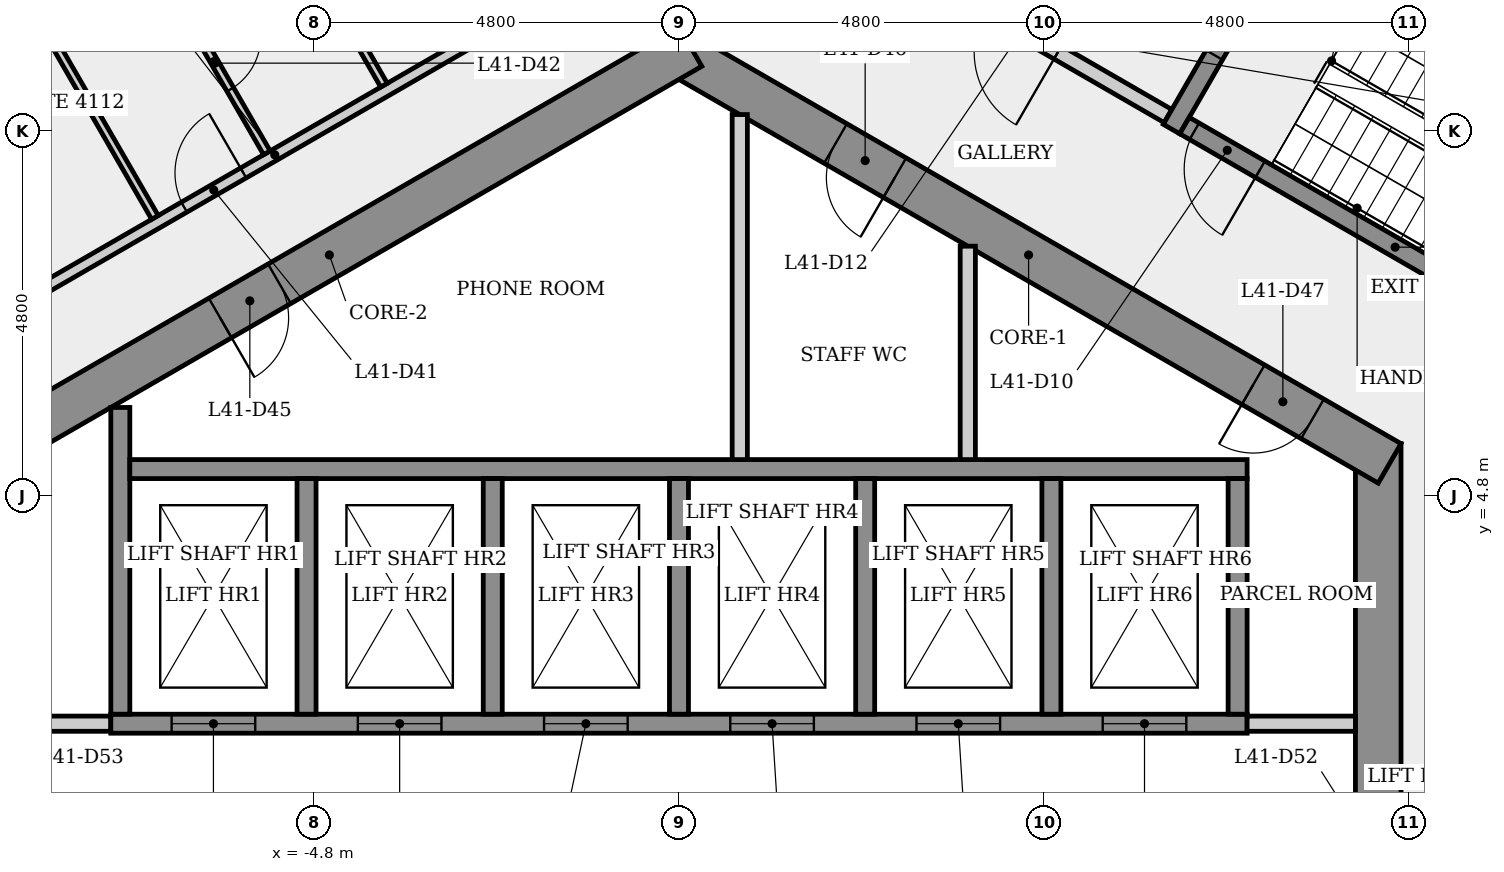
"""IFC4 building model, lengths in metres.
Left out: names, types, materials, properties, quantities, classifications, styles, units other than length and angle.
Written with IfcOpenShell. Run it as: python <this file> out.ifc"""

import sys

from ifc_helpers import new_model, si_unit, direction, frame, frame_2d, origin, place, context, subcontext, project, spatial, rectangle, extrude, element, fill, save


model = new_model("IFC4")
c1 = context("Model", 3, precision=1e-05, world=origin(), true_north=direction((0.0, 1.0)))
c2 = subcontext(c1, "Body", "Model", "MODEL_VIEW")
j1 = project(units=[si_unit("LENGTHUNIT", "METRE"), si_unit("PLANEANGLEUNIT", "RADIAN")], contexts=[c1])
p1 = place(None, origin())
s1 = spatial("IfcSite", under=j1, at=p1, CompositionType="ELEMENT")
p2 = place(p1, origin())
s2 = spatial("IfcBuilding", under=s1, at=p2, CompositionType="ELEMENT")
p3 = place(p2, frame((0.0, 0.0, 156.1)))
s3 = spatial("IfcBuildingStorey", under=s2, at=p3, CompositionType="ELEMENT", Elevation=156.1)
p4 = place(p3, frame((9.2, -5.485, 0.0), z_axis=(0.0, 0.0, 1.0), x_axis=(0.0, 1.0, 0.0)))
e1 = element("IfcWall", 1, at=p4, inside=s3, PredefinedType="SHEAR", context=c2, shape_type="SweptSolid", body=[
    extrude(rectangle(XDim=10.97, YDim=0.6, at=frame_2d((5.485, 0.0))), origin(), (0.0, 0.0, 1.0), 3.4),
])
p5 = place(p4, frame((4.685, 0.0, 0.0)))
e2 = element("IfcOpeningElement", 2, at=p5, cuts=e1, PredefinedType="OPENING", context=c2, shape_type="SweptSolid", body=[
    extrude(rectangle(XDim=1.6, YDim=2.1, at=frame_2d((0.8, 1.05))), frame((0.0, 0.31, 0.0), z_axis=(0.0, -1.0, 0.0), x_axis=(1.0, 0.0, 0.0)), (0.0, 0.0, 1.0), 0.62),
])
p6 = place(p3, frame((9.35, 5.225, 0.0), z_axis=(0.0, 0.0, 1.0), x_axis=(-0.866023993627, 0.500002442456, 0.0)))
e3 = element("IfcWall", 3, at=p6, inside=s3, PredefinedType="SHEAR", context=c2, shape_type="SweptSolid", body=[
    extrude(rectangle(XDim=10.97, YDim=0.6, at=frame_2d((5.485, 0.0))), origin(), (0.0, 0.0, 1.0), 3.4),
])
p7 = place(p6, frame((7.518, 0.0, 0.0)))
e4 = element("IfcOpeningElement", 4, at=p7, cuts=e3, PredefinedType="OPENING", context=c2, shape_type="SweptSolid", body=[
    extrude(rectangle(XDim=0.9, YDim=2.1, at=frame_2d((0.45, 1.05))), frame((0.0, 0.31, 0.0), z_axis=(0.0, -1.0, 0.0), x_axis=(1.0, 0.0, 0.0)), (0.0, 0.0, 1.0), 0.62),
])
p8 = place(p6, frame((1.172, 0.0, 0.0)))
e5 = element("IfcOpeningElement", 5, at=p8, cuts=e3, PredefinedType="OPENING", context=c2, shape_type="SweptSolid", body=[
    extrude(rectangle(XDim=0.9, YDim=2.1, at=frame_2d((0.45, 1.05))), frame((0.0, 0.31, 0.0), z_axis=(0.0, -1.0, 0.0), x_axis=(1.0, 0.0, 0.0)), (0.0, 0.0, 1.0), 0.62),
])
p9 = place(p3, frame((0.15, 10.71, 0.0), z_axis=(0.0, 0.0, 1.0), x_axis=(-0.866023993627, -0.500002442456, 0.0)))
e6 = element("IfcWall", 6, at=p9, inside=s3, PredefinedType="SHEAR", context=c2, shape_type="SweptSolid", body=[
    extrude(rectangle(XDim=10.97, YDim=0.6, at=frame_2d((5.485, 0.0))), origin(), (0.0, 0.0, 1.0), 3.4),
])
p10 = place(p9, frame((6.243, 0.0, 0.0)))
e7 = element("IfcOpeningElement", 7, at=p10, cuts=e6, PredefinedType="OPENING", context=c2, shape_type="SweptSolid", body=[
    extrude(rectangle(XDim=0.9, YDim=2.1, at=frame_2d((0.45, 1.05))), frame((0.0, 0.31, 0.0), z_axis=(0.0, -1.0, 0.0), x_axis=(1.0, 0.0, 0.0)), (0.0, 0.0, 1.0), 0.62),
])
p11 = place(p3, frame((-9.805, 6.694, 0.0), z_axis=(0.0, 0.0, 1.0), x_axis=(0.866028286753, 0.499995006518, 0.0)))
e8 = element("IfcWall", 8, at=p11, inside=s3, PredefinedType="PARTITIONING", context=c2, shape_type="SweptSolid", body=[
    extrude(rectangle(XDim=10.364, YDim=0.15, at=frame_2d((5.182, 0.0))), origin(), (0.0, 0.0, 1.0), 3.05),
])
p12 = place(p11, frame((3.805, 0.0, 0.0)))
e9 = element("IfcOpeningElement", 9, at=p12, cuts=e8, PredefinedType="OPENING", context=c2, shape_type="SweptSolid", body=[
    extrude(rectangle(XDim=0.9, YDim=2.1, at=frame_2d((0.45, 1.05))), frame((0.0, 0.085, 0.0), z_axis=(0.0, -1.0, 0.0), x_axis=(1.0, 0.0, 0.0)), (0.0, 0.0, 1.0), 0.17),
])
p13 = place(p3, frame((-8.9, 1.8, 0.0), z_axis=(0.0, 0.0, 1.0), x_axis=(1.0, 0.0, 0.0)))
e10 = element("IfcWall", 10, at=p13, inside=s3, PredefinedType="PARTITIONING", context=c2, shape_type="SweptSolid", body=[
    extrude(rectangle(XDim=1.425, YDim=0.2, at=frame_2d((0.712, 0.0))), origin(), (0.0, 0.0, 1.0), 3.05),
])
p14 = place(p3, frame((-10.6, 14.88, 0.0), z_axis=(0.0, 0.0, 1.0), x_axis=(0.499997136009, -0.866027057304, 0.0)))
e11 = element("IfcWall", 11, at=p14, inside=s3, PredefinedType="PARTITIONING", context=c2, shape_type="SweptSolid", body=[
    extrude(rectangle(XDim=7.412, YDim=0.1, at=frame_2d((3.706, 0.0))), origin(), (0.0, 0.0, 1.0), 3.05),
])
p15 = place(p3, frame((-7.475, 1.8, 0.0), z_axis=(0.0, 0.0, 1.0), x_axis=(1.0, 0.0, 0.0)))
e12 = element("IfcWall", 12, at=p15, inside=s3, PredefinedType="SHEAR", context=c2, shape_type="SweptSolid", body=[
    extrude(rectangle(XDim=14.95, YDim=0.25, at=frame_2d((7.475, 0.0))), origin(), (0.0, 0.0, 1.0), 3.05),
])
p16 = place(p15, frame((0.8, 0.0, 0.0)))
e13 = element("IfcOpeningElement", 13, at=p16, cuts=e12, PredefinedType="OPENING", context=c2, shape_type="SweptSolid", body=[
    extrude(rectangle(XDim=1.1, YDim=2.1, at=frame_2d((0.55, 1.05))), frame((0.0, 0.135, 0.0), z_axis=(0.0, -1.0, 0.0), x_axis=(1.0, 0.0, 0.0)), (0.0, 0.0, 1.0), 0.27),
])
p17 = place(p15, frame((3.25, 0.0, 0.0)))
e14 = element("IfcOpeningElement", 14, at=p17, cuts=e12, PredefinedType="OPENING", context=c2, shape_type="SweptSolid", body=[
    extrude(rectangle(XDim=1.1, YDim=2.1, at=frame_2d((0.55, 1.05))), frame((0.0, 0.135, 0.0), z_axis=(0.0, -1.0, 0.0), x_axis=(1.0, 0.0, 0.0)), (0.0, 0.0, 1.0), 0.27),
])
p18 = place(p15, frame((5.7, 0.0, 0.0)))
e15 = element("IfcOpeningElement", 15, at=p18, cuts=e12, PredefinedType="OPENING", context=c2, shape_type="SweptSolid", body=[
    extrude(rectangle(XDim=1.1, YDim=2.1, at=frame_2d((0.55, 1.05))), frame((0.0, 0.135, 0.0), z_axis=(0.0, -1.0, 0.0), x_axis=(1.0, 0.0, 0.0)), (0.0, 0.0, 1.0), 0.27),
])
p19 = place(p15, frame((8.15, 0.0, 0.0)))
e16 = element("IfcOpeningElement", 16, at=p19, cuts=e12, PredefinedType="OPENING", context=c2, shape_type="SweptSolid", body=[
    extrude(rectangle(XDim=1.1, YDim=2.1, at=frame_2d((0.55, 1.05))), frame((0.0, 0.135, 0.0), z_axis=(0.0, -1.0, 0.0), x_axis=(1.0, 0.0, 0.0)), (0.0, 0.0, 1.0), 0.27),
])
p20 = place(p15, frame((10.6, 0.0, 0.0)))
e17 = element("IfcOpeningElement", 17, at=p20, cuts=e12, PredefinedType="OPENING", context=c2, shape_type="SweptSolid", body=[
    extrude(rectangle(XDim=1.1, YDim=2.1, at=frame_2d((0.55, 1.05))), frame((0.0, 0.135, 0.0), z_axis=(0.0, -1.0, 0.0), x_axis=(1.0, 0.0, 0.0)), (0.0, 0.0, 1.0), 0.27),
])
p21 = place(p15, frame((13.05, 0.0, 0.0)))
e18 = element("IfcOpeningElement", 18, at=p21, cuts=e12, PredefinedType="OPENING", context=c2, shape_type="SweptSolid", body=[
    extrude(rectangle(XDim=1.1, YDim=2.1, at=frame_2d((0.55, 1.05))), frame((0.0, 0.135, 0.0), z_axis=(0.0, -1.0, 0.0), x_axis=(1.0, 0.0, 0.0)), (0.0, 0.0, 1.0), 0.27),
])
p22 = place(p3, frame((-7.35, 1.925, 0.0), z_axis=(0.0, 0.0, 1.0), x_axis=(0.0, 1.0, 0.0)))
e19 = element("IfcWall", 19, at=p22, inside=s3, PredefinedType="SHEAR", context=c2, shape_type="SweptSolid", body=[
    extrude(rectangle(XDim=4.036, YDim=0.25, at=frame_2d((2.018, 0.0))), origin(), (0.0, 0.0, 1.0), 3.05),
])
p23 = place(p3, frame((-7.225, 5.15, 0.0), z_axis=(0.0, 0.0, 1.0), x_axis=(1.0, 0.0, 0.0)))
e20 = element("IfcWall", 20, at=p23, inside=s3, PredefinedType="SHEAR", context=c2, shape_type="SweptSolid", body=[
    extrude(rectangle(XDim=14.7, YDim=0.25, at=frame_2d((7.35, 0.0))), origin(), (0.0, 0.0, 1.0), 3.05),
])
p24 = place(p3, frame((-6.81, 11.715, 0.0), z_axis=(0.0, 0.0, 1.0), x_axis=(0.50000932403, -0.866020020486, 0.0)))
e21 = element("IfcWall", 21, at=p24, inside=s3, PredefinedType="PARTITIONING", context=c2, shape_type="SweptSolid", body=[
    extrude(rectangle(XDim=2.775, YDim=0.1, at=frame_2d((1.387, 0.0))), origin(), (0.0, 0.0, 1.0), 3.05),
])
p25 = place(p24, frame((1.012, 0.0, 0.0)))
e22 = element("IfcOpeningElement", 22, at=p25, cuts=e21, PredefinedType="OPENING", context=c2, shape_type="SweptSolid", body=[
    extrude(rectangle(XDim=0.8, YDim=2.1, at=frame_2d((0.4, 1.05))), frame((0.0, 0.06, 0.0), z_axis=(0.0, -1.0, 0.0), x_axis=(1.0, 0.0, 0.0)), (0.0, 0.0, 1.0), 0.12),
])
p26 = place(p3, frame((-7.586, 16.62, 0.0), z_axis=(0.0, 0.0, 1.0), x_axis=(0.500011399757, -0.866018822032, 0.0)))
e23 = element("IfcWall", 23, at=p26, inside=s3, PredefinedType="PARTITIONING", context=c2, shape_type="SweptSolid", body=[
    extrude(rectangle(XDim=7.411, YDim=0.1, at=frame_2d((3.706, 0.0))), origin(), (0.0, 0.0, 1.0), 3.05),
])
for number, where, z_axis, x_axis in (
    (24, (-4.9, 5.025, 0.0), (0.0, 0.0, 1.0), (0.0, -1.0, 0.0)),
    (25, (-2.45, 5.025, 0.0), (0.0, 0.0, 1.0), (0.0, -1.0, 0.0)),
    (26, (0.0, 5.025, 0.0), (0.0, 0.0, 1.0), (0.0, -1.0, 0.0)),
):
    element("IfcWall", number, at=place(p3, frame(where, z_axis=z_axis, x_axis=x_axis)), inside=s3, PredefinedType="SHEAR", context=c2, shape_type="SweptSolid", body=[
        extrude(rectangle(XDim=3.1, YDim=0.25, at=frame_2d((1.55, 0.0))), origin(), (0.0, 0.0, 1.0), 3.4),
    ])
p27 = place(p3, frame((0.8, 9.815, 0.0), z_axis=(0.0, 0.0, 1.0), x_axis=(0.0, -1.0, 0.0)))
e27 = element("IfcWall", 27, at=p27, inside=s3, PredefinedType="PARTITIONING", context=c2, shape_type="SweptSolid", body=[
    extrude(rectangle(XDim=4.54, YDim=0.2, at=frame_2d((2.27, 0.0))), origin(), (0.0, 0.0, 1.0), 3.05),
])
p28 = place(p3, frame((2.45, 5.025, 0.0), z_axis=(0.0, 0.0, 1.0), x_axis=(0.0, -1.0, 0.0)))
e28 = element("IfcWall", 28, at=p28, inside=s3, PredefinedType="SHEAR", context=c2, shape_type="SweptSolid", body=[
    extrude(rectangle(XDim=3.1, YDim=0.25, at=frame_2d((1.55, 0.0))), origin(), (0.0, 0.0, 1.0), 3.4),
])
p29 = place(p3, frame((3.8, 8.083, 0.0), z_axis=(0.0, 0.0, 1.0), x_axis=(0.0, -1.0, 0.0)))
e29 = element("IfcWall", 29, at=p29, inside=s3, PredefinedType="PARTITIONING", context=c2, shape_type="SweptSolid", body=[
    extrude(rectangle(XDim=2.808, YDim=0.2, at=frame_2d((1.404, 0.0))), origin(), (0.0, 0.0, 1.0), 3.05),
])
p30 = place(p3, frame((4.9, 5.025, 0.0), z_axis=(0.0, 0.0, 1.0), x_axis=(0.0, -1.0, 0.0)))
e30 = element("IfcWall", 30, at=p30, inside=s3, PredefinedType="SHEAR", context=c2, shape_type="SweptSolid", body=[
    extrude(rectangle(XDim=3.1, YDim=0.25, at=frame_2d((1.55, 0.0))), origin(), (0.0, 0.0, 1.0), 3.4),
])
p31 = place(p3, frame((6.435, 9.795, 0.0), z_axis=(0.0, 0.0, 1.0), x_axis=(-0.866012907634, 0.500021643343, 0.0)))
e31 = element("IfcWall", 31, at=p31, inside=s3, PredefinedType="PARTITIONING", context=c2, shape_type="SweptSolid", body=[
    extrude(rectangle(XDim=4.45, YDim=0.2, at=frame_2d((2.225, 0.0))), origin(), (0.0, 0.0, 1.0), 3.05),
])
p32 = place(p31, frame((1.675, 0.0, 0.0)))
e32 = element("IfcOpeningElement", 32, at=p32, cuts=e31, PredefinedType="OPENING", context=c2, shape_type="SweptSolid", body=[
    extrude(rectangle(XDim=1.1, YDim=2.1, at=frame_2d((0.55, 1.05))), frame((0.0, 0.11, 0.0), z_axis=(0.0, -1.0, 0.0), x_axis=(1.0, 0.0, 0.0)), (0.0, 0.0, 1.0), 0.22),
])
p33 = place(p3, frame((6.48, 9.624, 0.0), z_axis=(0.0, 0.0, 1.0), x_axis=(0.500017246033, 0.866015446554, 0.0)))
e33 = element("IfcWall", 33, at=p33, inside=s3, PredefinedType="SHEAR", context=c2, shape_type="SweptSolid", body=[
    extrude(rectangle(XDim=3.25, YDim=0.25, at=frame_2d((1.625, 0.0))), origin(), (0.0, 0.0, 1.0), 3.05),
])
p34 = place(p33, frame((1.125, 0.0, 0.0)))
e34 = element("IfcOpeningElement", 34, at=p34, cuts=e33, PredefinedType="OPENING", context=c2, shape_type="SweptSolid", body=[
    extrude(rectangle(XDim=1.0, YDim=2.1, at=frame_2d((0.5, 1.05))), frame((0.0, 0.135, 0.0), z_axis=(0.0, -1.0, 0.0), x_axis=(1.0, 0.0, 0.0)), (0.0, 0.0, 1.0), 0.27),
])
p35 = place(p3, frame((7.475, 1.8, 0.0), z_axis=(0.0, 0.0, 1.0), x_axis=(1.0, 0.0, 0.0)))
e35 = element("IfcWall", 35, at=p35, inside=s3, PredefinedType="PARTITIONING", context=c2, shape_type="SweptSolid", body=[
    extrude(rectangle(XDim=1.425, YDim=0.2, at=frame_2d((0.712, 0.0))), origin(), (0.0, 0.0, 1.0), 3.05),
])
p36 = place(p3, frame((7.35, 5.025, 0.0), z_axis=(0.0, 0.0, 1.0), x_axis=(0.0, -1.0, 0.0)))
e36 = element("IfcWall", 36, at=p36, inside=s3, PredefinedType="SHEAR", context=c2, shape_type="SweptSolid", body=[
    extrude(rectangle(XDim=3.1, YDim=0.25, at=frame_2d((1.55, 0.0))), origin(), (0.0, 0.0, 1.0), 3.4),
])
p37 = place(p3, frame((8.151, 12.268, 0.0), z_axis=(0.0, 0.0, 1.0), x_axis=(0.866032601554, -0.49998753289, 0.0)))
e37 = element("IfcWall", 37, at=p37, inside=s3, PredefinedType="SHEAR", context=c2, shape_type="SweptSolid", body=[
    extrude(rectangle(XDim=6.325, YDim=0.25, at=frame_2d((3.163, 0.0))), origin(), (0.0, 0.0, 1.0), 3.05),
])
p38 = place(p3, frame((12.194, 6.47, 0.0), z_axis=(0.0, 0.0, 1.0), x_axis=(-0.866025499775, 0.499999833739, 0.0)))
e38 = element("IfcWall", 38, at=p38, inside=s3, PredefinedType="SHEAR", context=c2, shape_type="SweptSolid", body=[
    extrude(rectangle(XDim=6.4, YDim=0.25, at=frame_2d((3.2, 0.0))), origin(), (0.0, 0.0, 1.0), 3.05),
])
p39 = place(p38, frame((5.25, 0.0, 0.0)))
e39 = element("IfcOpeningElement", 39, at=p39, cuts=e38, PredefinedType="OPENING", context=c2, shape_type="SweptSolid", body=[
    extrude(rectangle(XDim=1.0, YDim=2.1, at=frame_2d((0.5, 1.05))), frame((0.0, 0.135, 0.0), z_axis=(0.0, -1.0, 0.0), x_axis=(1.0, 0.0, 0.0)), (0.0, 0.0, 1.0), 0.27),
])
p40 = place(p16, origin())
e40 = element("IfcDoor", 40, at=p40, inside=s3, OperationType="SLIDING_TO_LEFT", PredefinedType="DOOR", context=c2, shape_type="SweptSolid", body=[
    extrude(rectangle(XDim=1.1, YDim=2.1, at=frame_2d((0.55, 1.05))), frame((0.0, 0.025, 0.0), z_axis=(0.0, -1.0, 0.0), x_axis=(1.0, 0.0, 0.0)), (0.0, 0.0, 1.0), 0.05),
])
fill(e13, e40)
p41 = place(p17, origin())
e41 = element("IfcDoor", 41, at=p41, inside=s3, OperationType="SLIDING_TO_LEFT", PredefinedType="DOOR", context=c2, shape_type="SweptSolid", body=[
    extrude(rectangle(XDim=1.1, YDim=2.1, at=frame_2d((0.55, 1.05))), frame((0.0, 0.025, 0.0), z_axis=(0.0, -1.0, 0.0), x_axis=(1.0, 0.0, 0.0)), (0.0, 0.0, 1.0), 0.05),
])
fill(e14, e41)
p42 = place(p18, origin())
e42 = element("IfcDoor", 42, at=p42, inside=s3, OperationType="SLIDING_TO_LEFT", PredefinedType="DOOR", context=c2, shape_type="SweptSolid", body=[
    extrude(rectangle(XDim=1.1, YDim=2.1, at=frame_2d((0.55, 1.05))), frame((0.0, 0.025, 0.0), z_axis=(0.0, -1.0, 0.0), x_axis=(1.0, 0.0, 0.0)), (0.0, 0.0, 1.0), 0.05),
])
fill(e15, e42)
p43 = place(p19, origin())
e43 = element("IfcDoor", 43, at=p43, inside=s3, OperationType="SLIDING_TO_LEFT", PredefinedType="DOOR", context=c2, shape_type="SweptSolid", body=[
    extrude(rectangle(XDim=1.1, YDim=2.1, at=frame_2d((0.55, 1.05))), frame((0.0, 0.025, 0.0), z_axis=(0.0, -1.0, 0.0), x_axis=(1.0, 0.0, 0.0)), (0.0, 0.0, 1.0), 0.05),
])
fill(e16, e43)
p44 = place(p20, origin())
e44 = element("IfcDoor", 44, at=p44, inside=s3, OperationType="SLIDING_TO_LEFT", PredefinedType="DOOR", context=c2, shape_type="SweptSolid", body=[
    extrude(rectangle(XDim=1.1, YDim=2.1, at=frame_2d((0.55, 1.05))), frame((0.0, 0.025, 0.0), z_axis=(0.0, -1.0, 0.0), x_axis=(1.0, 0.0, 0.0)), (0.0, 0.0, 1.0), 0.05),
])
fill(e17, e44)
p45 = place(p21, origin())
e45 = element("IfcDoor", 45, at=p45, inside=s3, OperationType="SLIDING_TO_LEFT", PredefinedType="DOOR", context=c2, shape_type="SweptSolid", body=[
    extrude(rectangle(XDim=1.1, YDim=2.1, at=frame_2d((0.55, 1.05))), frame((0.0, 0.025, 0.0), z_axis=(0.0, -1.0, 0.0), x_axis=(1.0, 0.0, 0.0)), (0.0, 0.0, 1.0), 0.05),
])
fill(e18, e45)
p46 = place(p39, origin())
e46 = element("IfcDoor", 46, at=p46, inside=s3, OperationType="SINGLE_SWING_LEFT", PredefinedType="DOOR", context=c2, shape_type="SweptSolid", body=[
    extrude(rectangle(XDim=1.0, YDim=2.1, at=frame_2d((0.5, 1.05))), frame((0.0, 0.025, 0.0), z_axis=(0.0, -1.0, 0.0), x_axis=(1.0, 0.0, 0.0)), (0.0, 0.0, 1.0), 0.05),
])
fill(e39, e46)
p47 = place(p34, origin())
e47 = element("IfcDoor", 47, at=p47, inside=s3, OperationType="SINGLE_SWING_RIGHT", PredefinedType="DOOR", context=c2, shape_type="SweptSolid", body=[
    extrude(rectangle(XDim=1.0, YDim=2.1, at=frame_2d((0.5, 1.05))), frame((0.0, 0.025, 0.0), z_axis=(0.0, -1.0, 0.0), x_axis=(1.0, 0.0, 0.0)), (0.0, 0.0, 1.0), 0.05),
])
fill(e34, e47)
p48 = place(p32, origin())
e48 = element("IfcDoor", 48, at=p48, inside=s3, OperationType="SINGLE_SWING_LEFT", PredefinedType="DOOR", context=c2, shape_type="SweptSolid", body=[
    extrude(rectangle(XDim=1.1, YDim=2.1, at=frame_2d((0.55, 1.05))), frame((0.0, 0.025, 0.0), z_axis=(0.0, -1.0, 0.0), x_axis=(1.0, 0.0, 0.0)), (0.0, 0.0, 1.0), 0.05),
])
fill(e32, e48)
p49 = place(p12, origin())
e49 = element("IfcDoor", 49, at=p49, inside=s3, OperationType="SINGLE_SWING_RIGHT", PredefinedType="DOOR", context=c2, shape_type="SweptSolid", body=[
    extrude(rectangle(XDim=0.9, YDim=2.1, at=frame_2d((0.45, 1.05))), frame((0.0, 0.025, 0.0), z_axis=(0.0, -1.0, 0.0), x_axis=(1.0, 0.0, 0.0)), (0.0, 0.0, 1.0), 0.05),
])
fill(e9, e49)
p50 = place(p25, origin())
e50 = element("IfcDoor", 50, at=p50, inside=s3, OperationType="SINGLE_SWING_LEFT", PredefinedType="DOOR", context=c2, shape_type="SweptSolid", body=[
    extrude(rectangle(XDim=0.8, YDim=2.1, at=frame_2d((0.4, 1.05))), frame((0.0, 0.025, 0.0), z_axis=(0.0, -1.0, 0.0), x_axis=(1.0, 0.0, 0.0)), (0.0, 0.0, 1.0), 0.05),
])
fill(e22, e50)
p51 = place(p10, origin())
e51 = element("IfcDoor", 51, at=p51, inside=s3, OperationType="SINGLE_SWING_RIGHT", PredefinedType="DOOR", context=c2, shape_type="SweptSolid", body=[
    extrude(rectangle(XDim=0.9, YDim=2.1, at=frame_2d((0.45, 1.05))), frame((0.0, 0.025, 0.0), z_axis=(0.0, -1.0, 0.0), x_axis=(1.0, 0.0, 0.0)), (0.0, 0.0, 1.0), 0.05),
])
fill(e7, e51)
p52 = place(p7, origin())
e52 = element("IfcDoor", 52, at=p52, inside=s3, OperationType="SINGLE_SWING_LEFT", PredefinedType="DOOR", context=c2, shape_type="SweptSolid", body=[
    extrude(rectangle(XDim=0.9, YDim=2.1, at=frame_2d((0.45, 1.05))), frame((0.0, 0.025, 0.0), z_axis=(0.0, -1.0, 0.0), x_axis=(1.0, 0.0, 0.0)), (0.0, 0.0, 1.0), 0.05),
])
fill(e4, e52)
p53 = place(p8, origin())
e53 = element("IfcDoor", 53, at=p53, inside=s3, OperationType="SINGLE_SWING_RIGHT", PredefinedType="DOOR", context=c2, shape_type="SweptSolid", body=[
    extrude(rectangle(XDim=0.9, YDim=2.1, at=frame_2d((0.45, 1.05))), frame((0.0, 0.025, 0.0), z_axis=(0.0, -1.0, 0.0), x_axis=(1.0, 0.0, 0.0)), (0.0, 0.0, 1.0), 0.05),
])
fill(e5, e53)
save(model, sys.argv[1])
